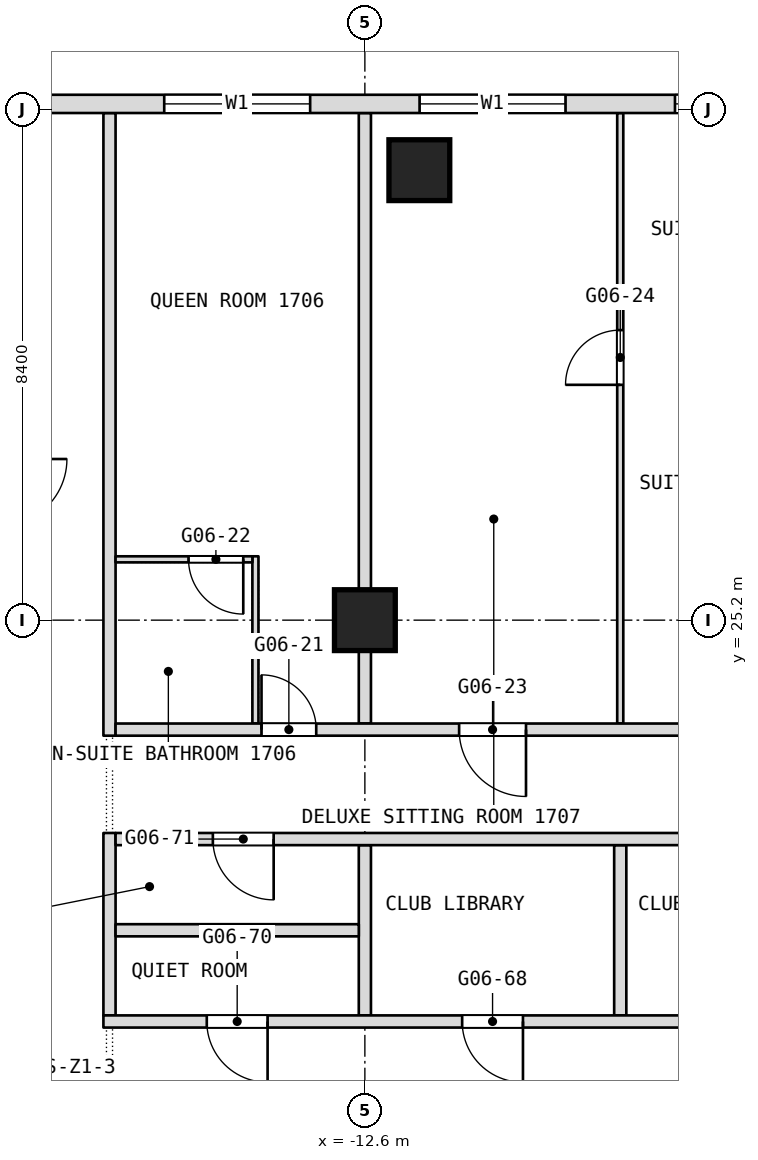
"""IFC4 building model, lengths in metres.
Left out: names, types, materials, properties, quantities, classifications, styles, units other than length and angle.
Written with IfcOpenShell. Run it as: python <this file> out.ifc"""

import sys

from ifc_helpers import new_model, si_unit, direction, frame, frame_2d, origin, origin_2d, place, context, subcontext, project, spatial, rectangle, extrude, element, fill, save


model = new_model("IFC4")
c1 = context("Model", 3, precision=1e-05, world=origin(), true_north=direction((0.0, 1.0)))
c2 = subcontext(c1, "Body", "Model", "MODEL_VIEW")
j1 = project(units=[si_unit("LENGTHUNIT", "METRE"), si_unit("PLANEANGLEUNIT", "RADIAN")], contexts=[c1])
p1 = place(None, origin())
s1 = spatial("IfcSite", under=j1, at=p1, CompositionType="ELEMENT")
p2 = place(p1, origin())
s2 = spatial("IfcBuilding", under=s1, at=p2, CompositionType="ELEMENT")
p3 = place(p2, frame((0.0, 0.0, 76.1)))
s3 = spatial("IfcBuildingStorey", under=s2, at=p3, CompositionType="ELEMENT", Elevation=76.1)
for number, where, z_axis, x_axis in (
    (1, (-12.6, 25.2, 0.0), (0.0, 0.0, 1.0), (1.0, 0.0, 0.0)),
    (2, (-11.704, 32.6, 0.0), (0.0, 0.0, 1.0), (1.0, 0.0, 0.0)),
):
    element("IfcColumn", number, at=place(p3, frame(where, z_axis=z_axis, x_axis=x_axis)), inside=s3, PredefinedType="COLUMN", context=c2, shape_type="SweptSolid", body=[
        extrude(rectangle(XDim=1.0, YDim=1.0, at=origin_2d()), origin(), (0.0, 0.0, 1.0), 3.6),
    ])
p4 = place(p3, frame((-8.4, 18.7, 0.0), z_axis=(0.0, 0.0, 1.0), x_axis=(0.0, 1.0, 0.0)))
e3 = element("IfcWall", 3, at=p4, inside=s3, PredefinedType="PARTITIONING", context=c2, shape_type="SweptSolid", body=[
    extrude(rectangle(XDim=2.8, YDim=0.2, at=frame_2d((1.4, 0.0))), origin(), (0.0, 0.0, 1.0), 3.34),
])
p5 = place(p3, frame((-8.4, 23.5, 0.0), z_axis=(0.0, 0.0, 1.0), x_axis=(0.0, 1.0, 0.0)))
e4 = element("IfcWall", 4, at=p5, inside=s3, PredefinedType="PARTITIONING", context=c2, shape_type="SweptSolid", body=[
    extrude(rectangle(XDim=10.04, YDim=0.1, at=frame_2d((5.02, 0.0))), origin(), (0.0, 0.0, 1.0), 3.34),
])
p6 = place(p5, frame((5.57, 0.0, 0.0)))
e5 = element("IfcOpeningElement", 5, at=p6, cuts=e4, PredefinedType="OPENING", context=c2, shape_type="SweptSolid", body=[
    extrude(rectangle(XDim=0.9, YDim=2.1, at=frame_2d((0.45, 1.05))), frame((0.0, 0.05, 0.0), z_axis=(0.0, -1.0, 0.0), x_axis=(1.0, 0.0, 0.0)), (0.0, 0.0, 1.0), 0.1),
])
p7 = place(p3, frame((-12.6, 18.7, 0.0), z_axis=(0.0, 0.0, 1.0), x_axis=(0.0, 1.0, 0.0)))
e6 = element("IfcWall", 6, at=p7, inside=s3, PredefinedType="PARTITIONING", context=c2, shape_type="SweptSolid", body=[
    extrude(rectangle(XDim=2.8, YDim=0.2, at=frame_2d((1.4, 0.0))), origin(), (0.0, 0.0, 1.0), 3.34),
])
p8 = place(p3, frame((-12.6, 23.5, 0.0), z_axis=(0.0, 0.0, 1.0), x_axis=(0.0, 1.0, 0.0)))
e7 = element("IfcWall", 7, at=p8, inside=s3, PredefinedType="PARTITIONING", context=c2, shape_type="SweptSolid", body=[
    extrude(rectangle(XDim=10.04, YDim=0.2, at=frame_2d((5.02, 0.0))), origin(), (0.0, 0.0, 1.0), 3.34),
])
p9 = place(p3, frame((-14.4, 23.5, 0.0), z_axis=(0.0, 0.0, 1.0), x_axis=(0.0, 1.0, 0.0)))
e8 = element("IfcWall", 8, at=p9, inside=s3, PredefinedType="PARTITIONING", context=c2, shape_type="SweptSolid", body=[
    extrude(rectangle(XDim=2.75, YDim=0.1, at=frame_2d((1.375, 0.0))), origin(), (0.0, 0.0, 1.0), 3.34),
])
p10 = place(p3, frame((-16.8, 18.7, 0.0), z_axis=(0.0, 0.0, 1.0), x_axis=(0.0, 1.0, 0.0)))
e9 = element("IfcWall", 9, at=p10, inside=s3, PredefinedType="PARTITIONING", context=c2, shape_type="SweptSolid", body=[
    extrude(rectangle(XDim=3.0, YDim=0.2, at=frame_2d((1.5, 0.0))), origin(), (0.0, 0.0, 1.0), 3.34),
])
p11 = place(p3, frame((-16.8, 23.3, 0.0), z_axis=(0.0, 0.0, 1.0), x_axis=(0.0, 1.0, 0.0)))
e10 = element("IfcWall", 10, at=p11, inside=s3, PredefinedType="PARTITIONING", context=c2, shape_type="SweptSolid", body=[
    extrude(rectangle(XDim=10.24, YDim=0.2, at=frame_2d((5.12, 0.0))), origin(), (0.0, 0.0, 1.0), 3.34),
])
p12 = place(p3, frame((-16.9, 18.6, 0.0), z_axis=(0.0, 0.0, 1.0), x_axis=(1.0, 0.0, 0.0)))
e11 = element("IfcWall", 11, at=p12, inside=s3, PredefinedType="PARTITIONING", context=c2, shape_type="SweptSolid", body=[
    extrude(rectangle(XDim=25.1, YDim=0.2, at=frame_2d((12.55, 0.0))), origin(), (0.0, 0.0, 1.0), 3.34),
])
p13 = place(p12, frame((16.0, 0.0, 0.0)))
e12 = element("IfcOpeningElement", 12, at=p13, cuts=e11, PredefinedType="OPENING", context=c2, shape_type="SweptSolid", body=[
    extrude(rectangle(XDim=1.8, YDim=2.1, at=frame_2d((0.9, 1.05))), frame((0.0, 0.1, 0.0), z_axis=(0.0, -1.0, 0.0), x_axis=(1.0, 0.0, 0.0)), (0.0, 0.0, 1.0), 0.2),
])
p14 = place(p12, frame((5.9, 0.0, 0.0)))
e13 = element("IfcOpeningElement", 13, at=p14, cuts=e11, PredefinedType="OPENING", context=c2, shape_type="SweptSolid", body=[
    extrude(rectangle(XDim=1.0, YDim=2.1, at=frame_2d((0.5, 1.05))), frame((0.0, 0.1, 0.0), z_axis=(0.0, -1.0, 0.0), x_axis=(1.0, 0.0, 0.0)), (0.0, 0.0, 1.0), 0.2),
])
p15 = place(p12, frame((10.1, 0.0, 0.0)))
e14 = element("IfcOpeningElement", 14, at=p15, cuts=e11, PredefinedType="OPENING", context=c2, shape_type="SweptSolid", body=[
    extrude(rectangle(XDim=1.0, YDim=2.1, at=frame_2d((0.5, 1.05))), frame((0.0, 0.1, 0.0), z_axis=(0.0, -1.0, 0.0), x_axis=(1.0, 0.0, 0.0)), (0.0, 0.0, 1.0), 0.2),
])
p16 = place(p12, frame((1.7, 0.0, 0.0)))
e15 = element("IfcOpeningElement", 15, at=p16, cuts=e11, PredefinedType="OPENING", context=c2, shape_type="SweptSolid", body=[
    extrude(rectangle(XDim=1.0, YDim=2.1, at=frame_2d((0.5, 1.05))), frame((0.0, 0.1, 0.0), z_axis=(0.0, -1.0, 0.0), x_axis=(1.0, 0.0, 0.0)), (0.0, 0.0, 1.0), 0.2),
])
p17 = place(p12, frame((22.55, 0.0, 0.0)))
e16 = element("IfcOpeningElement", 16, at=p17, cuts=e11, PredefinedType="OPENING", context=c2, shape_type="SweptSolid", body=[
    extrude(rectangle(XDim=1.0, YDim=2.1, at=frame_2d((0.5, 1.05))), frame((0.0, 0.1, 0.0), z_axis=(0.0, -1.0, 0.0), x_axis=(1.0, 0.0, 0.0)), (0.0, 0.0, 1.0), 0.2),
])
p18 = place(p3, frame((-16.7, 20.1, 0.0), z_axis=(0.0, 0.0, 1.0), x_axis=(1.0, 0.0, 0.0)))
e17 = element("IfcWall", 17, at=p18, inside=s3, PredefinedType="PARTITIONING", context=c2, shape_type="SweptSolid", body=[
    extrude(rectangle(XDim=4.0, YDim=0.2, at=frame_2d((2.0, 0.0))), origin(), (0.0, 0.0, 1.0), 3.34),
])
p19 = place(p3, frame((-16.7, 21.6, 0.0), z_axis=(0.0, 0.0, 1.0), x_axis=(1.0, 0.0, 0.0)))
e18 = element("IfcWall", 18, at=p19, inside=s3, PredefinedType="PARTITIONING", context=c2, shape_type="SweptSolid", body=[
    extrude(rectangle(XDim=24.7, YDim=0.2, at=frame_2d((12.35, 0.0))), origin(), (0.0, 0.0, 1.0), 3.34),
])
p20 = place(p19, frame((1.6, 0.0, 0.0)))
e19 = element("IfcOpeningElement", 19, at=p20, cuts=e18, PredefinedType="OPENING", context=c2, shape_type="SweptSolid", body=[
    extrude(rectangle(XDim=1.0, YDim=2.1, at=frame_2d((0.5, 1.05))), frame((0.0, 0.1, 0.0), z_axis=(0.0, -1.0, 0.0), x_axis=(1.0, 0.0, 0.0)), (0.0, 0.0, 1.0), 0.2),
])
p21 = place(p19, frame((22.25, 0.0, 0.0)))
e20 = element("IfcOpeningElement", 20, at=p21, cuts=e18, PredefinedType="OPENING", context=c2, shape_type="SweptSolid", body=[
    extrude(rectangle(XDim=1.0, YDim=2.1, at=frame_2d((0.5, 1.05))), frame((0.0, 0.1, 0.0), z_axis=(0.0, -1.0, 0.0), x_axis=(1.0, 0.0, 0.0)), (0.0, 0.0, 1.0), 0.2),
])
p22 = place(p3, frame((-16.7, 23.4, 0.0), z_axis=(0.0, 0.0, 1.0), x_axis=(1.0, 0.0, 0.0)))
e21 = element("IfcWall", 21, at=p22, inside=s3, PredefinedType="PARTITIONING", context=c2, shape_type="SweptSolid", body=[
    extrude(rectangle(XDim=23.4, YDim=0.2, at=frame_2d((11.7, 0.0))), origin(), (0.0, 0.0, 1.0), 3.34),
])
p23 = place(p22, frame((2.4, 0.0, 0.0)))
e22 = element("IfcOpeningElement", 22, at=p23, cuts=e21, PredefinedType="OPENING", context=c2, shape_type="SweptSolid", body=[
    extrude(rectangle(XDim=0.9, YDim=2.1, at=frame_2d((0.45, 1.05))), frame((0.0, 0.1, 0.0), z_axis=(0.0, -1.0, 0.0), x_axis=(1.0, 0.0, 0.0)), (0.0, 0.0, 1.0), 0.2),
])
p24 = place(p22, frame((5.65, 0.0, 0.0)))
e23 = element("IfcOpeningElement", 23, at=p24, cuts=e21, PredefinedType="OPENING", context=c2, shape_type="SweptSolid", body=[
    extrude(rectangle(XDim=1.1, YDim=2.1, at=frame_2d((0.55, 1.05))), frame((0.0, 0.1, 0.0), z_axis=(0.0, -1.0, 0.0), x_axis=(1.0, 0.0, 0.0)), (0.0, 0.0, 1.0), 0.2),
])
p25 = place(p22, frame((15.3, 0.0, 0.0)))
e24 = element("IfcOpeningElement", 24, at=p25, cuts=e21, PredefinedType="OPENING", context=c2, shape_type="SweptSolid", body=[
    extrude(rectangle(XDim=1.0, YDim=2.1, at=frame_2d((0.5, 1.05))), frame((0.0, 0.1, 0.0), z_axis=(0.0, -1.0, 0.0), x_axis=(1.0, 0.0, 0.0)), (0.0, 0.0, 1.0), 0.2),
])
p26 = place(p22, frame((17.1, 0.0, 0.0)))
e25 = element("IfcOpeningElement", 25, at=p26, cuts=e21, PredefinedType="OPENING", context=c2, shape_type="SweptSolid", body=[
    extrude(rectangle(XDim=1.0, YDim=2.1, at=frame_2d((0.5, 1.05))), frame((0.0, 0.1, 0.0), z_axis=(0.0, -1.0, 0.0), x_axis=(1.0, 0.0, 0.0)), (0.0, 0.0, 1.0), 0.2),
])
p27 = place(p3, frame((-16.7, 26.2, 0.0), z_axis=(0.0, 0.0, 1.0), x_axis=(1.0, 0.0, 0.0)))
e26 = element("IfcWall", 26, at=p27, inside=s3, PredefinedType="PARTITIONING", context=c2, shape_type="SweptSolid", body=[
    extrude(rectangle(XDim=2.25, YDim=0.1, at=frame_2d((1.125, 0.0))), origin(), (0.0, 0.0, 1.0), 3.34),
])
p28 = place(p27, frame((1.2, 0.0, 0.0)))
e27 = element("IfcOpeningElement", 27, at=p28, cuts=e26, PredefinedType="OPENING", context=c2, shape_type="SweptSolid", body=[
    extrude(rectangle(XDim=0.9, YDim=2.1, at=frame_2d((0.45, 1.05))), frame((0.0, 0.05, 0.0), z_axis=(0.0, -1.0, 0.0), x_axis=(1.0, 0.0, 0.0)), (0.0, 0.0, 1.0), 0.1),
])
p29 = place(p3, frame((23.406, 33.69, 0.0), z_axis=(0.0, 0.0, 1.0), x_axis=(-1.0, 0.0, 0.0)))
e28 = element("IfcWall", 28, at=p29, inside=s3, PredefinedType="NOTDEFINED", context=c2, shape_type="SweptSolid", body=[
    extrude(rectangle(XDim=46.812, YDim=0.3, at=frame_2d((23.406, 0.0))), origin(), (0.0, 0.0, 1.0), 3.6),
])
p30 = place(p29, frame((2.186, 0.0, 0.9)))
e29 = element("IfcOpeningElement", 29, at=p30, cuts=e28, PredefinedType="OPENING", context=c2, shape_type="SweptSolid", body=[
    extrude(rectangle(XDim=2.4, YDim=2.1, at=frame_2d((1.2, 1.05))), frame((0.0, 0.15, 0.0), z_axis=(0.0, -1.0, 0.0), x_axis=(1.0, 0.0, 0.0)), (0.0, 0.0, 1.0), 0.3),
])
p31 = place(p29, frame((7.506, 0.0, 0.9)))
e30 = element("IfcOpeningElement", 30, at=p31, cuts=e28, PredefinedType="OPENING", context=c2, shape_type="SweptSolid", body=[
    extrude(rectangle(XDim=2.4, YDim=2.1, at=frame_2d((1.2, 1.05))), frame((0.0, 0.15, 0.0), z_axis=(0.0, -1.0, 0.0), x_axis=(1.0, 0.0, 0.0)), (0.0, 0.0, 1.0), 0.3),
])
p32 = place(p29, frame((11.706, 0.0, 0.9)))
e31 = element("IfcOpeningElement", 31, at=p32, cuts=e28, PredefinedType="OPENING", context=c2, shape_type="SweptSolid", body=[
    extrude(rectangle(XDim=2.4, YDim=2.1, at=frame_2d((1.2, 1.05))), frame((0.0, 0.15, 0.0), z_axis=(0.0, -1.0, 0.0), x_axis=(1.0, 0.0, 0.0)), (0.0, 0.0, 1.0), 0.3),
])
p33 = place(p29, frame((15.906, 0.0, 0.9)))
e32 = element("IfcOpeningElement", 32, at=p33, cuts=e28, PredefinedType="OPENING", context=c2, shape_type="SweptSolid", body=[
    extrude(rectangle(XDim=2.4, YDim=2.1, at=frame_2d((1.2, 1.05))), frame((0.0, 0.15, 0.0), z_axis=(0.0, -1.0, 0.0), x_axis=(1.0, 0.0, 0.0)), (0.0, 0.0, 1.0), 0.3),
])
p34 = place(p29, frame((20.106, 0.0, 0.9)))
e33 = element("IfcOpeningElement", 33, at=p34, cuts=e28, PredefinedType="OPENING", context=c2, shape_type="SweptSolid", body=[
    extrude(rectangle(XDim=2.4, YDim=2.1, at=frame_2d((1.2, 1.05))), frame((0.0, 0.15, 0.0), z_axis=(0.0, -1.0, 0.0), x_axis=(1.0, 0.0, 0.0)), (0.0, 0.0, 1.0), 0.3),
])
p35 = place(p29, frame((24.306, 0.0, 0.9)))
e34 = element("IfcOpeningElement", 34, at=p35, cuts=e28, PredefinedType="OPENING", context=c2, shape_type="SweptSolid", body=[
    extrude(rectangle(XDim=2.4, YDim=2.1, at=frame_2d((1.2, 1.05))), frame((0.0, 0.15, 0.0), z_axis=(0.0, -1.0, 0.0), x_axis=(1.0, 0.0, 0.0)), (0.0, 0.0, 1.0), 0.3),
])
p36 = place(p29, frame((28.506, 0.0, 0.9)))
e35 = element("IfcOpeningElement", 35, at=p36, cuts=e28, PredefinedType="OPENING", context=c2, shape_type="SweptSolid", body=[
    extrude(rectangle(XDim=2.4, YDim=2.1, at=frame_2d((1.2, 1.05))), frame((0.0, 0.15, 0.0), z_axis=(0.0, -1.0, 0.0), x_axis=(1.0, 0.0, 0.0)), (0.0, 0.0, 1.0), 0.3),
])
p37 = place(p29, frame((32.706, 0.0, 0.9)))
e36 = element("IfcOpeningElement", 36, at=p37, cuts=e28, PredefinedType="OPENING", context=c2, shape_type="SweptSolid", body=[
    extrude(rectangle(XDim=2.4, YDim=2.1, at=frame_2d((1.2, 1.05))), frame((0.0, 0.15, 0.0), z_axis=(0.0, -1.0, 0.0), x_axis=(1.0, 0.0, 0.0)), (0.0, 0.0, 1.0), 0.3),
])
p38 = place(p29, frame((36.906, 0.0, 0.9)))
e37 = element("IfcOpeningElement", 37, at=p38, cuts=e28, PredefinedType="OPENING", context=c2, shape_type="SweptSolid", body=[
    extrude(rectangle(XDim=2.4, YDim=2.1, at=frame_2d((1.2, 1.05))), frame((0.0, 0.15, 0.0), z_axis=(0.0, -1.0, 0.0), x_axis=(1.0, 0.0, 0.0)), (0.0, 0.0, 1.0), 0.3),
])
p39 = place(p29, frame((42.226, 0.0, 0.9)))
e38 = element("IfcOpeningElement", 38, at=p39, cuts=e28, PredefinedType="OPENING", context=c2, shape_type="SweptSolid", body=[
    extrude(rectangle(XDim=2.4, YDim=2.1, at=frame_2d((1.2, 1.05))), frame((0.0, 0.15, 0.0), z_axis=(0.0, -1.0, 0.0), x_axis=(1.0, 0.0, 0.0)), (0.0, 0.0, 1.0), 0.3),
])
p40 = place(p6, origin())
e39 = element("IfcDoor", 39, at=p40, inside=s3, OperationType="SINGLE_SWING_RIGHT", PredefinedType="DOOR", context=c2, shape_type="SweptSolid", body=[
    extrude(rectangle(XDim=0.9, YDim=2.1, at=frame_2d((0.45, 1.05))), frame((0.0, 0.025, 0.0), z_axis=(0.0, -1.0, 0.0), x_axis=(1.0, 0.0, 0.0)), (0.0, 0.0, 1.0), 0.05),
])
fill(e5, e39)
p41 = place(p14, origin())
e40 = element("IfcDoor", 40, at=p41, inside=s3, OperationType="SINGLE_SWING_RIGHT", PredefinedType="DOOR", context=c2, shape_type="SweptSolid", body=[
    extrude(rectangle(XDim=1.0, YDim=2.1, at=frame_2d((0.5, 1.05))), frame((0.0, 0.025, 0.0), z_axis=(0.0, -1.0, 0.0), x_axis=(1.0, 0.0, 0.0)), (0.0, 0.0, 1.0), 0.05),
])
fill(e13, e40)
p42 = place(p16, origin())
e41 = element("IfcDoor", 41, at=p42, inside=s3, OperationType="SINGLE_SWING_RIGHT", PredefinedType="DOOR", context=c2, shape_type="SweptSolid", body=[
    extrude(rectangle(XDim=1.0, YDim=2.1, at=frame_2d((0.5, 1.05))), frame((0.0, 0.025, 0.0), z_axis=(0.0, -1.0, 0.0), x_axis=(1.0, 0.0, 0.0)), (0.0, 0.0, 1.0), 0.05),
])
fill(e15, e41)
p43 = place(p20, origin())
e42 = element("IfcDoor", 42, at=p43, inside=s3, OperationType="SINGLE_SWING_RIGHT", PredefinedType="DOOR", context=c2, shape_type="SweptSolid", body=[
    extrude(rectangle(XDim=1.0, YDim=2.1, at=frame_2d((0.5, 1.05))), frame((0.0, 0.025, 0.0), z_axis=(0.0, -1.0, 0.0), x_axis=(1.0, 0.0, 0.0)), (0.0, 0.0, 1.0), 0.05),
])
fill(e19, e42)
p44 = place(p23, origin())
e43 = element("IfcDoor", 43, at=p44, inside=s3, OperationType="SINGLE_SWING_LEFT", PredefinedType="DOOR", context=c2, shape_type="SweptSolid", body=[
    extrude(rectangle(XDim=0.9, YDim=2.1, at=frame_2d((0.45, 1.05))), frame((0.0, 0.025, 0.0), z_axis=(0.0, -1.0, 0.0), x_axis=(1.0, 0.0, 0.0)), (0.0, 0.0, 1.0), 0.05),
])
fill(e22, e43)
p45 = place(p24, origin())
e44 = element("IfcDoor", 44, at=p45, inside=s3, OperationType="SINGLE_SWING_RIGHT", PredefinedType="DOOR", context=c2, shape_type="SweptSolid", body=[
    extrude(rectangle(XDim=1.1, YDim=2.1, at=frame_2d((0.55, 1.05))), frame((0.0, 0.025, 0.0), z_axis=(0.0, -1.0, 0.0), x_axis=(1.0, 0.0, 0.0)), (0.0, 0.0, 1.0), 0.05),
])
fill(e23, e44)
p46 = place(p28, origin())
e45 = element("IfcDoor", 45, at=p46, inside=s3, OperationType="SINGLE_SWING_LEFT", PredefinedType="DOOR", context=c2, shape_type="SweptSolid", body=[
    extrude(rectangle(XDim=0.9, YDim=2.1, at=frame_2d((0.45, 1.05))), frame((0.0, 0.025, 0.0), z_axis=(0.0, -1.0, 0.0), x_axis=(1.0, 0.0, 0.0)), (0.0, 0.0, 1.0), 0.05),
])
fill(e27, e45)
p47 = place(p36, origin())
e46 = element("IfcWindow", 46, at=p47, inside=s3, PartitioningType="SINGLE_PANEL", PredefinedType="WINDOW", context=c2, shape_type="SweptSolid", body=[
    extrude(rectangle(XDim=2.4, YDim=2.1, at=frame_2d((1.2, 1.05))), frame((0.0, 0.03, 0.0), z_axis=(0.0, -1.0, 0.0), x_axis=(1.0, 0.0, 0.0)), (0.0, 0.0, 1.0), 0.06),
])
fill(e35, e46)
p48 = place(p37, origin())
e47 = element("IfcWindow", 47, at=p48, inside=s3, PartitioningType="SINGLE_PANEL", PredefinedType="WINDOW", context=c2, shape_type="SweptSolid", body=[
    extrude(rectangle(XDim=2.4, YDim=2.1, at=frame_2d((1.2, 1.05))), frame((0.0, 0.03, 0.0), z_axis=(0.0, -1.0, 0.0), x_axis=(1.0, 0.0, 0.0)), (0.0, 0.0, 1.0), 0.06),
])
fill(e36, e47)
p49 = place(p38, origin())
e48 = element("IfcWindow", 48, at=p49, inside=s3, PartitioningType="SINGLE_PANEL", PredefinedType="WINDOW", context=c2, shape_type="SweptSolid", body=[
    extrude(rectangle(XDim=2.4, YDim=2.1, at=frame_2d((1.2, 1.05))), frame((0.0, 0.03, 0.0), z_axis=(0.0, -1.0, 0.0), x_axis=(1.0, 0.0, 0.0)), (0.0, 0.0, 1.0), 0.06),
])
fill(e37, e48)
save(model, sys.argv[1])
